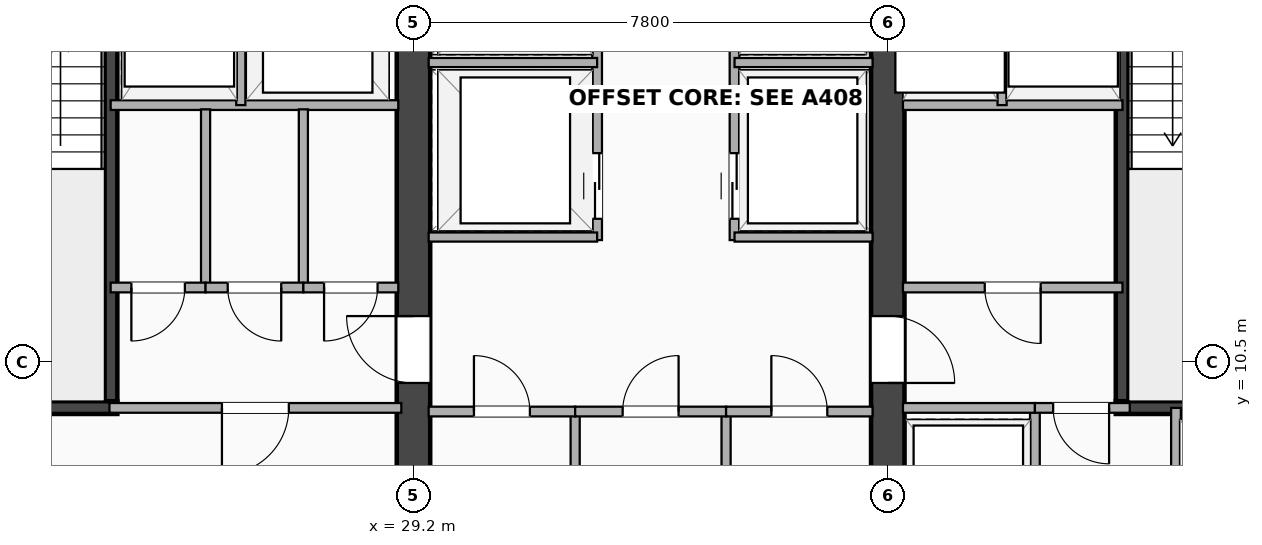
"""IFC4 building model, lengths in metres.
Left out: names, types, materials, properties, quantities, classifications, styles, units other than length and angle.
Written with IfcOpenShell. Run it as: python <this file> out.ifc"""

import sys

from ifc_helpers import new_model, si_unit, direction, frame, frame_2d, origin, place, context, subcontext, project, spatial, rectangle, extrude, element, fill, save


model = new_model("IFC4")
c1 = context("Model", 3, precision=1e-05, world=origin(), true_north=direction((0.0, 1.0)))
c2 = subcontext(c1, "Body", "Model", "MODEL_VIEW")
j1 = project(units=[si_unit("LENGTHUNIT", "METRE"), si_unit("PLANEANGLEUNIT", "RADIAN")], contexts=[c1])
p1 = place(None, origin())
s1 = spatial("IfcSite", under=j1, at=p1, CompositionType="ELEMENT")
p2 = place(p1, origin())
s2 = spatial("IfcBuilding", under=s1, at=p2, CompositionType="ELEMENT")
p3 = place(p2, frame((0.0, 0.0, 95.2)))
s3 = spatial("IfcBuildingStorey", under=s2, at=p3, CompositionType="ELEMENT", Elevation=95.2)
p4 = place(p3, frame((29.2, 3.5, 0.0), z_axis=(0.0, 0.0, 1.0), x_axis=(0.0, 1.0, 0.0)))
e1 = element("IfcWall", 1, at=p4, inside=s3, PredefinedType="SHEAR", context=c2, shape_type="SweptSolid", body=[
    extrude(rectangle(XDim=16.9, YDim=0.55, at=frame_2d((8.45, 0.0))), origin(), (0.0, 0.0, 1.0), 3.24),
])
p5 = place(p4, frame((7.75, 0.0, 0.0), z_axis=(0.0, 0.0, 1.0), x_axis=(-1.0, 0.0, 0.0)))
e2 = element("IfcOpeningElement", 2, at=p5, cuts=e1, PredefinedType="OPENING", context=c2, shape_type="SweptSolid", body=[
    extrude(rectangle(XDim=1.1, YDim=2.15, at=frame_2d((0.55, 1.075))), frame((0.0, 0.285, 0.0), z_axis=(0.0, -1.0, 0.0), x_axis=(1.0, 0.0, 0.0)), (0.0, 0.0, 1.0), 0.57),
])
p6 = place(p3, frame((37.0, 3.5, 0.0), z_axis=(0.0, 0.0, 1.0), x_axis=(0.0, 1.0, 0.0)))
e3 = element("IfcWall", 3, at=p6, inside=s3, PredefinedType="SHEAR", context=c2, shape_type="SweptSolid", body=[
    extrude(rectangle(XDim=16.9, YDim=0.55, at=frame_2d((8.45, 0.0))), origin(), (0.0, 0.0, 1.0), 3.24),
])
p7 = place(p6, frame((6.65, 0.0, 0.0)))
e4 = element("IfcOpeningElement", 4, at=p7, cuts=e3, PredefinedType="OPENING", context=c2, shape_type="SweptSolid", body=[
    extrude(rectangle(XDim=1.1, YDim=2.15, at=frame_2d((0.55, 1.075))), frame((0.0, 0.285, 0.0), z_axis=(0.0, -1.0, 0.0), x_axis=(1.0, 0.0, 0.0)), (0.0, 0.0, 1.0), 0.57),
])
p8 = place(p3, frame((24.225, 9.745, 0.0), z_axis=(0.0, 0.0, 1.0), x_axis=(0.0, 1.0, 0.0)))
e5 = element("IfcWall", 5, at=p8, inside=s3, PredefinedType="SHEAR", context=c2, shape_type="SweptSolid", body=[
    extrude(rectangle(XDim=8.01, YDim=0.21, at=frame_2d((4.005, 0.0))), origin(), (0.0, 0.0, 1.0), 3.24),
])
p9 = place(p3, frame((20.67, 9.745, 0.0), z_axis=(0.0, 0.0, 1.0), x_axis=(1.0, 0.0, 0.0)))
e6 = element("IfcWall", 6, at=p9, inside=s3, PredefinedType="SHEAR", context=c2, shape_type="SweptSolid", body=[
    extrude(rectangle(XDim=3.66, YDim=0.21, at=frame_2d((1.83, 0.0))), origin(), (0.0, 0.0, 1.0), 3.24),
])
p10 = place(p3, frame((40.855, 9.745, 0.0), z_axis=(0.0, 0.0, 1.0), x_axis=(0.0, 1.0, 0.0)))
e7 = element("IfcWall", 7, at=p10, inside=s3, PredefinedType="SHEAR", context=c2, shape_type="SweptSolid", body=[
    extrude(rectangle(XDim=8.01, YDim=0.21, at=frame_2d((4.005, 0.0))), origin(), (0.0, 0.0, 1.0), 3.24),
])
p11 = place(p3, frame((40.75, 9.745, 0.0), z_axis=(0.0, 0.0, 1.0), x_axis=(1.0, 0.0, 0.0)))
e8 = element("IfcWall", 8, at=p11, inside=s3, PredefinedType="SHEAR", context=c2, shape_type="SweptSolid", body=[
    extrude(rectangle(XDim=3.66, YDim=0.21, at=frame_2d((1.83, 0.0))), origin(), (0.0, 0.0, 1.0), 3.24),
])
p12 = place(p3, frame((24.22, 14.72, 0.0), z_axis=(0.0, 0.0, 1.0), x_axis=(1.0, 0.0, 0.0)))
e9 = element("IfcWall", 9, at=p12, inside=s3, PredefinedType="PARTITIONING", context=c2, shape_type="SweptSolid", body=[
    extrude(rectangle(XDim=4.73, YDim=0.16, at=frame_2d((2.365, 0.0))), origin(), (0.0, 0.0, 1.0), 3.24),
])
p13 = place(p3, frame((26.36, 14.72, 0.0), z_axis=(0.0, 0.0, 1.0), x_axis=(0.0, 1.0, 0.0)))
e10 = element("IfcWall", 10, at=p13, inside=s3, PredefinedType="PARTITIONING", context=c2, shape_type="SweptSolid", body=[
    extrude(rectangle(XDim=3.04, YDim=0.15, at=frame_2d((1.52, 0.0))), origin(), (0.0, 0.0, 1.0), 3.24),
])
p14 = place(p3, frame((37.25, 14.72, 0.0), z_axis=(0.0, 0.0, 1.0), x_axis=(1.0, 0.0, 0.0)))
e11 = element("IfcWall", 11, at=p14, inside=s3, PredefinedType="PARTITIONING", context=c2, shape_type="SweptSolid", body=[
    extrude(rectangle(XDim=3.61, YDim=0.16, at=frame_2d((1.805, 0.0))), origin(), (0.0, 0.0, 1.0), 3.24),
])
p15 = place(p3, frame((38.88, 14.72, 0.0), z_axis=(0.0, 0.0, 1.0), x_axis=(0.0, 1.0, 0.0)))
e12 = element("IfcWall", 12, at=p15, inside=s3, PredefinedType="PARTITIONING", context=c2, shape_type="SweptSolid", body=[
    extrude(rectangle(XDim=3.04, YDim=0.15, at=frame_2d((1.52, 0.0))), origin(), (0.0, 0.0, 1.0), 3.24),
])
p16 = place(p3, frame((25.781, 11.72, 0.0), z_axis=(0.0, 0.0, 1.0), x_axis=(0.0, 1.0, 0.0)))
e13 = element("IfcWall", 13, at=p16, inside=s3, PredefinedType="PARTITIONING", context=c2, shape_type="SweptSolid", body=[
    extrude(rectangle(XDim=2.93, YDim=0.15, at=frame_2d((1.465, 0.0))), origin(), (0.0, 0.0, 1.0), 3.24),
])
p17 = place(p3, frame((24.22, 11.72, 0.0), z_axis=(0.0, 0.0, 1.0), x_axis=(1.0, 0.0, 0.0)))
e14 = element("IfcWall", 14, at=p17, inside=s3, PredefinedType="PARTITIONING", context=c2, shape_type="SweptSolid", body=[
    extrude(rectangle(XDim=1.561, YDim=0.16, at=frame_2d((0.781, 0.0))), origin(), (0.0, 0.0, 1.0), 3.24),
])
p18 = place(p17, frame((0.341, 0.0, 0.0)))
e15 = element("IfcOpeningElement", 15, at=p18, cuts=e14, PredefinedType="OPENING", context=c2, shape_type="SweptSolid", body=[
    extrude(rectangle(XDim=0.88, YDim=2.08, at=frame_2d((0.44, 1.04))), frame((0.0, 0.09, 0.0), z_axis=(0.0, -1.0, 0.0), x_axis=(1.0, 0.0, 0.0)), (0.0, 0.0, 1.0), 0.18),
])
p19 = place(p3, frame((27.389, 11.72, 0.0), z_axis=(0.0, 0.0, 1.0), x_axis=(0.0, 1.0, 0.0)))
e16 = element("IfcWall", 16, at=p19, inside=s3, PredefinedType="PARTITIONING", context=c2, shape_type="SweptSolid", body=[
    extrude(rectangle(XDim=2.93, YDim=0.15, at=frame_2d((1.465, 0.0))), origin(), (0.0, 0.0, 1.0), 3.24),
])
p20 = place(p3, frame((25.781, 11.72, 0.0), z_axis=(0.0, 0.0, 1.0), x_axis=(1.0, 0.0, 0.0)))
e17 = element("IfcWall", 17, at=p20, inside=s3, PredefinedType="PARTITIONING", context=c2, shape_type="SweptSolid", body=[
    extrude(rectangle(XDim=1.608, YDim=0.16, at=frame_2d((0.804, 0.0))), origin(), (0.0, 0.0, 1.0), 3.24),
])
p21 = place(p20, frame((0.364, 0.0, 0.0)))
e18 = element("IfcOpeningElement", 18, at=p21, cuts=e17, PredefinedType="OPENING", context=c2, shape_type="SweptSolid", body=[
    extrude(rectangle(XDim=0.88, YDim=2.08, at=frame_2d((0.44, 1.04))), frame((0.0, 0.09, 0.0), z_axis=(0.0, -1.0, 0.0), x_axis=(1.0, 0.0, 0.0)), (0.0, 0.0, 1.0), 0.18),
])
p22 = place(p3, frame((27.389, 11.72, 0.0), z_axis=(0.0, 0.0, 1.0), x_axis=(1.0, 0.0, 0.0)))
e19 = element("IfcWall", 19, at=p22, inside=s3, PredefinedType="PARTITIONING", context=c2, shape_type="SweptSolid", body=[
    extrude(rectangle(XDim=1.561, YDim=0.16, at=frame_2d((0.78, 0.0))), origin(), (0.0, 0.0, 1.0), 3.24),
])
p23 = place(p22, frame((0.341, 0.0, 0.0)))
e20 = element("IfcOpeningElement", 20, at=p23, cuts=e19, PredefinedType="OPENING", context=c2, shape_type="SweptSolid", body=[
    extrude(rectangle(XDim=0.88, YDim=2.08, at=frame_2d((0.44, 1.04))), frame((0.0, 0.09, 0.0), z_axis=(0.0, -1.0, 0.0), x_axis=(1.0, 0.0, 0.0)), (0.0, 0.0, 1.0), 0.18),
])
p24 = place(p3, frame((37.25, 11.72, 0.0), z_axis=(0.0, 0.0, 1.0), x_axis=(1.0, 0.0, 0.0)))
e21 = element("IfcWall", 21, at=p24, inside=s3, PredefinedType="PARTITIONING", context=c2, shape_type="SweptSolid", body=[
    extrude(rectangle(XDim=3.61, YDim=0.16, at=frame_2d((1.805, 0.0))), origin(), (0.0, 0.0, 1.0), 3.24),
])
p25 = place(p24, frame((1.345, 0.0, 0.0)))
e22 = element("IfcOpeningElement", 22, at=p25, cuts=e21, PredefinedType="OPENING", context=c2, shape_type="SweptSolid", body=[
    extrude(rectangle(XDim=0.92, YDim=2.08, at=frame_2d((0.46, 1.04))), frame((0.0, 0.09, 0.0), z_axis=(0.0, -1.0, 0.0), x_axis=(1.0, 0.0, 0.0)), (0.0, 0.0, 1.0), 0.18),
])
p26 = place(p3, frame((24.2, 9.74, 0.0), z_axis=(0.0, 0.0, 1.0), x_axis=(1.0, 0.0, 0.0)))
e23 = element("IfcWall", 23, at=p26, inside=s3, PredefinedType="PARTITIONING", context=c2, shape_type="SweptSolid", body=[
    extrude(rectangle(XDim=4.8, YDim=0.16, at=frame_2d((2.4, 0.0))), origin(), (0.0, 0.0, 1.0), 3.24),
])
p27 = place(p26, frame((1.85, 0.0, 0.0)))
e24 = element("IfcOpeningElement", 24, at=p27, cuts=e23, PredefinedType="OPENING", context=c2, shape_type="SweptSolid", body=[
    extrude(rectangle(XDim=1.1, YDim=2.15, at=frame_2d((0.55, 1.075))), frame((0.0, 0.09, 0.0), z_axis=(0.0, -1.0, 0.0), x_axis=(1.0, 0.0, 0.0)), (0.0, 0.0, 1.0), 0.18),
])
for number, where, z_axis, x_axis in (
    (25, (39.42, 3.9, 0.0), (0.0, 0.0, 1.0), (0.0, 1.0, 0.0)),
    (26, (41.74, 3.9, 0.0), (0.0, 0.0, 1.0), (0.0, 1.0, 0.0)),
):
    element("IfcWall", number, at=place(p3, frame(where, z_axis=z_axis, x_axis=x_axis)), inside=s3, PredefinedType="PARTITIONING", context=c2, shape_type="SweptSolid", body=[
        extrude(rectangle(XDim=5.84, YDim=0.16, at=frame_2d((2.92, 0.0))), origin(), (0.0, 0.0, 1.0), 3.24),
    ])
p28 = place(p3, frame((37.25, 9.74, 0.0), z_axis=(0.0, 0.0, 1.0), x_axis=(1.0, 0.0, 0.0)))
e27 = element("IfcWall", 27, at=p28, inside=s3, PredefinedType="PARTITIONING", context=c2, shape_type="SweptSolid", body=[
    extrude(rectangle(XDim=2.17, YDim=0.16, at=frame_2d((1.085, 0.0))), origin(), (0.0, 0.0, 1.0), 3.24),
])
p29 = place(p3, frame((39.42, 9.74, 0.0), z_axis=(0.0, 0.0, 1.0), x_axis=(1.0, 0.0, 0.0)))
e28 = element("IfcWall", 28, at=p29, inside=s3, PredefinedType="PARTITIONING", context=c2, shape_type="SweptSolid", body=[
    extrude(rectangle(XDim=1.56, YDim=0.16, at=frame_2d((0.78, 0.0))), origin(), (0.0, 0.0, 1.0), 3.24),
])
p30 = place(p29, frame((0.3, 0.0, 0.0)))
e29 = element("IfcOpeningElement", 29, at=p30, cuts=e28, PredefinedType="OPENING", context=c2, shape_type="SweptSolid", body=[
    extrude(rectangle(XDim=0.92, YDim=2.08, at=frame_2d((0.46, 1.04))), frame((0.0, 0.09, 0.0), z_axis=(0.0, -1.0, 0.0), x_axis=(1.0, 0.0, 0.0)), (0.0, 0.0, 1.0), 0.18),
])
p31 = place(p3, frame((31.859, 3.95, 0.0), z_axis=(0.0, 0.0, 1.0), x_axis=(0.0, 1.0, 0.0)))
e30 = element("IfcWall", 30, at=p31, inside=s3, PredefinedType="PARTITIONING", context=c2, shape_type="SweptSolid", body=[
    extrude(rectangle(XDim=5.73, YDim=0.15, at=frame_2d((2.865, 0.0))), origin(), (0.0, 0.0, 1.0), 3.24),
])
p32 = place(p3, frame((29.45, 9.68, 0.0), z_axis=(0.0, 0.0, 1.0), x_axis=(1.0, 0.0, 0.0)))
e31 = element("IfcWall", 31, at=p32, inside=s3, PredefinedType="PARTITIONING", context=c2, shape_type="SweptSolid", body=[
    extrude(rectangle(XDim=2.409, YDim=0.16, at=frame_2d((1.205, 0.0))), origin(), (0.0, 0.0, 1.0), 3.24),
])
p33 = place(p32, frame((1.664, 0.0, 0.0), z_axis=(0.0, 0.0, 1.0), x_axis=(-1.0, 0.0, 0.0)))
e32 = element("IfcOpeningElement", 32, at=p33, cuts=e31, PredefinedType="OPENING", context=c2, shape_type="SweptSolid", body=[
    extrude(rectangle(XDim=0.92, YDim=2.08, at=frame_2d((0.46, 1.04))), frame((0.0, 0.09, 0.0), z_axis=(0.0, -1.0, 0.0), x_axis=(1.0, 0.0, 0.0)), (0.0, 0.0, 1.0), 0.18),
])
p34 = place(p3, frame((34.341, 3.95, 0.0), z_axis=(0.0, 0.0, 1.0), x_axis=(0.0, 1.0, 0.0)))
e33 = element("IfcWall", 33, at=p34, inside=s3, PredefinedType="PARTITIONING", context=c2, shape_type="SweptSolid", body=[
    extrude(rectangle(XDim=5.73, YDim=0.15, at=frame_2d((2.865, 0.0))), origin(), (0.0, 0.0, 1.0), 3.24),
])
p35 = place(p3, frame((31.859, 9.68, 0.0), z_axis=(0.0, 0.0, 1.0), x_axis=(1.0, 0.0, 0.0)))
e34 = element("IfcWall", 34, at=p35, inside=s3, PredefinedType="PARTITIONING", context=c2, shape_type="SweptSolid", body=[
    extrude(rectangle(XDim=2.482, YDim=0.16, at=frame_2d((1.241, 0.0))), origin(), (0.0, 0.0, 1.0), 3.24),
])
p36 = place(p35, frame((1.701, 0.0, 0.0), z_axis=(0.0, 0.0, 1.0), x_axis=(-1.0, 0.0, 0.0)))
e35 = element("IfcOpeningElement", 35, at=p36, cuts=e34, PredefinedType="OPENING", context=c2, shape_type="SweptSolid", body=[
    extrude(rectangle(XDim=0.92, YDim=2.08, at=frame_2d((0.46, 1.04))), frame((0.0, 0.09, 0.0), z_axis=(0.0, -1.0, 0.0), x_axis=(1.0, 0.0, 0.0)), (0.0, 0.0, 1.0), 0.18),
])
p37 = place(p3, frame((34.341, 9.68, 0.0), z_axis=(0.0, 0.0, 1.0), x_axis=(1.0, 0.0, 0.0)))
e36 = element("IfcWall", 36, at=p37, inside=s3, PredefinedType="PARTITIONING", context=c2, shape_type="SweptSolid", body=[
    extrude(rectangle(XDim=2.409, YDim=0.16, at=frame_2d((1.205, 0.0))), origin(), (0.0, 0.0, 1.0), 3.24),
])
p38 = place(p37, frame((1.664, 0.0, 0.0), z_axis=(0.0, 0.0, 1.0), x_axis=(-1.0, 0.0, 0.0)))
e37 = element("IfcOpeningElement", 37, at=p38, cuts=e36, PredefinedType="OPENING", context=c2, shape_type="SweptSolid", body=[
    extrude(rectangle(XDim=0.92, YDim=2.08, at=frame_2d((0.46, 1.04))), frame((0.0, 0.09, 0.0), z_axis=(0.0, -1.0, 0.0), x_axis=(1.0, 0.0, 0.0)), (0.0, 0.0, 1.0), 0.18),
])
p39 = place(p3, frame((32.22, 12.5, 0.0), z_axis=(0.0, 0.0, 1.0), x_axis=(0.0, 1.0, 0.0)))
e38 = element("IfcWall", 38, at=p39, inside=s3, PredefinedType="PARTITIONING", context=c2, shape_type="SweptSolid", body=[
    extrude(rectangle(XDim=7.92, YDim=0.16, at=frame_2d((3.96, 0.0))), origin(), (0.0, 0.0, 1.0), 2.614),
])
p40 = place(p39, frame((1.43, 0.0, 0.0), z_axis=(0.0, 0.0, 1.0), x_axis=(-1.0, 0.0, 0.0)))
e39 = element("IfcOpeningElement", 39, at=p40, cuts=e38, PredefinedType="OPENING", context=c2, shape_type="SweptSolid", body=[
    extrude(rectangle(XDim=1.08, YDim=2.16, at=frame_2d((0.54, 1.08))), frame((0.0, 0.09, 0.0), z_axis=(0.0, -1.0, 0.0), x_axis=(1.0, 0.0, 0.0)), (0.0, 0.0, 1.0), 0.18),
])
p41 = place(p39, frame((4.33, 0.0, 0.0), z_axis=(0.0, 0.0, 1.0), x_axis=(-1.0, 0.0, 0.0)))
e40 = element("IfcOpeningElement", 40, at=p41, cuts=e38, PredefinedType="OPENING", context=c2, shape_type="SweptSolid", body=[
    extrude(rectangle(XDim=1.08, YDim=2.16, at=frame_2d((0.54, 1.08))), frame((0.0, 0.09, 0.0), z_axis=(0.0, -1.0, 0.0), x_axis=(1.0, 0.0, 0.0)), (0.0, 0.0, 1.0), 0.18),
])
p42 = place(p39, frame((6.1, 0.0, 0.0)))
e41 = element("IfcOpeningElement", 41, at=p42, cuts=e38, PredefinedType="OPENING", context=c2, shape_type="SweptSolid", body=[
    extrude(rectangle(XDim=0.88, YDim=2.08, at=frame_2d((0.44, 1.04))), frame((0.0, 0.09, 0.0), z_axis=(0.0, -1.0, 0.0), x_axis=(1.0, 0.0, 0.0)), (0.0, 0.0, 1.0), 0.18),
])
p43 = place(p3, frame((34.48, 12.5, 0.0), z_axis=(0.0, 0.0, 1.0), x_axis=(0.0, 1.0, 0.0)))
e42 = element("IfcWall", 42, at=p43, inside=s3, PredefinedType="PARTITIONING", context=c2, shape_type="SweptSolid", body=[
    extrude(rectangle(XDim=7.92, YDim=0.16, at=frame_2d((3.96, 0.0))), origin(), (0.0, 0.0, 1.0), 2.614),
])
p44 = place(p43, frame((0.35, 0.0, 0.0)))
e43 = element("IfcOpeningElement", 43, at=p44, cuts=e42, PredefinedType="OPENING", context=c2, shape_type="SweptSolid", body=[
    extrude(rectangle(XDim=1.08, YDim=2.16, at=frame_2d((0.54, 1.08))), frame((0.0, 0.09, 0.0), z_axis=(0.0, -1.0, 0.0), x_axis=(1.0, 0.0, 0.0)), (0.0, 0.0, 1.0), 0.18),
])
p45 = place(p43, frame((3.25, 0.0, 0.0)))
e44 = element("IfcOpeningElement", 44, at=p45, cuts=e42, PredefinedType="OPENING", context=c2, shape_type="SweptSolid", body=[
    extrude(rectangle(XDim=1.08, YDim=2.16, at=frame_2d((0.54, 1.08))), frame((0.0, 0.09, 0.0), z_axis=(0.0, -1.0, 0.0), x_axis=(1.0, 0.0, 0.0)), (0.0, 0.0, 1.0), 0.18),
])
p46 = place(p43, frame((6.98, 0.0, 0.0), z_axis=(0.0, 0.0, 1.0), x_axis=(-1.0, 0.0, 0.0)))
e45 = element("IfcOpeningElement", 45, at=p46, cuts=e42, PredefinedType="OPENING", context=c2, shape_type="SweptSolid", body=[
    extrude(rectangle(XDim=0.88, YDim=2.08, at=frame_2d((0.44, 1.04))), frame((0.0, 0.09, 0.0), z_axis=(0.0, -1.0, 0.0), x_axis=(1.0, 0.0, 0.0)), (0.0, 0.0, 1.0), 0.18),
])
p47 = place(p3, frame((29.45, 12.55, 0.0), z_axis=(0.0, 0.0, 1.0), x_axis=(1.0, 0.0, 0.0)))
e46 = element("IfcWall", 46, at=p47, inside=s3, PredefinedType="PARTITIONING", context=c2, shape_type="SweptSolid", body=[
    extrude(rectangle(XDim=2.77, YDim=0.15, at=frame_2d((1.385, 0.0))), origin(), (0.0, 0.0, 1.0), 3.24),
])
p48 = place(p3, frame((34.48, 12.55, 0.0), z_axis=(0.0, 0.0, 1.0), x_axis=(1.0, 0.0, 0.0)))
e47 = element("IfcWall", 47, at=p48, inside=s3, PredefinedType="PARTITIONING", context=c2, shape_type="SweptSolid", body=[
    extrude(rectangle(XDim=2.27, YDim=0.15, at=frame_2d((1.135, 0.0))), origin(), (0.0, 0.0, 1.0), 3.24),
])
p49 = place(p3, frame((29.45, 15.42, 0.0), z_axis=(0.0, 0.0, 1.0), x_axis=(1.0, 0.0, 0.0)))
e48 = element("IfcWall", 48, at=p49, inside=s3, PredefinedType="PARTITIONING", context=c2, shape_type="SweptSolid", body=[
    extrude(rectangle(XDim=2.77, YDim=0.15, at=frame_2d((1.385, 0.0))), origin(), (0.0, 0.0, 1.0), 3.24),
])
p50 = place(p3, frame((34.48, 15.42, 0.0), z_axis=(0.0, 0.0, 1.0), x_axis=(1.0, 0.0, 0.0)))
e49 = element("IfcWall", 49, at=p50, inside=s3, PredefinedType="PARTITIONING", context=c2, shape_type="SweptSolid", body=[
    extrude(rectangle(XDim=2.27, YDim=0.15, at=frame_2d((1.135, 0.0))), origin(), (0.0, 0.0, 1.0), 3.24),
])
p51 = place(p5, origin())
e50 = element("IfcDoor", 50, at=p51, inside=s3, OperationType="SINGLE_SWING_RIGHT", PredefinedType="DOOR", context=c2, shape_type="SweptSolid", body=[
    extrude(rectangle(XDim=1.1, YDim=2.15, at=frame_2d((0.55, 1.075))), frame((0.0, 0.025, 0.0), z_axis=(0.0, -1.0, 0.0), x_axis=(1.0, 0.0, 0.0)), (0.0, 0.0, 1.0), 0.05),
])
fill(e2, e50)
p52 = place(p7, origin())
e51 = element("IfcDoor", 51, at=p52, inside=s3, OperationType="SINGLE_SWING_LEFT", PredefinedType="DOOR", context=c2, shape_type="SweptSolid", body=[
    extrude(rectangle(XDim=1.1, YDim=2.15, at=frame_2d((0.55, 1.075))), frame((0.0, 0.025, 0.0), z_axis=(0.0, -1.0, 0.0), x_axis=(1.0, 0.0, 0.0)), (0.0, 0.0, 1.0), 0.05),
])
fill(e4, e51)
p53 = place(p18, origin())
e52 = element("IfcDoor", 52, at=p53, inside=s3, OperationType="SINGLE_SWING_LEFT", PredefinedType="DOOR", context=c2, shape_type="SweptSolid", body=[
    extrude(rectangle(XDim=0.88, YDim=2.08, at=frame_2d((0.44, 1.04))), frame((0.0, 0.025, 0.0), z_axis=(0.0, -1.0, 0.0), x_axis=(1.0, 0.0, 0.0)), (0.0, 0.0, 1.0), 0.05),
])
fill(e15, e52)
p54 = place(p21, origin())
e53 = element("IfcDoor", 53, at=p54, inside=s3, OperationType="SINGLE_SWING_RIGHT", PredefinedType="DOOR", context=c2, shape_type="SweptSolid", body=[
    extrude(rectangle(XDim=0.88, YDim=2.08, at=frame_2d((0.44, 1.04))), frame((0.0, 0.025, 0.0), z_axis=(0.0, -1.0, 0.0), x_axis=(1.0, 0.0, 0.0)), (0.0, 0.0, 1.0), 0.05),
])
fill(e18, e53)
p55 = place(p23, origin())
e54 = element("IfcDoor", 54, at=p55, inside=s3, OperationType="SINGLE_SWING_LEFT", PredefinedType="DOOR", context=c2, shape_type="SweptSolid", body=[
    extrude(rectangle(XDim=0.88, YDim=2.08, at=frame_2d((0.44, 1.04))), frame((0.0, 0.025, 0.0), z_axis=(0.0, -1.0, 0.0), x_axis=(1.0, 0.0, 0.0)), (0.0, 0.0, 1.0), 0.05),
])
fill(e20, e54)
p56 = place(p25, origin())
e55 = element("IfcDoor", 55, at=p56, inside=s3, OperationType="SINGLE_SWING_RIGHT", PredefinedType="DOOR", context=c2, shape_type="SweptSolid", body=[
    extrude(rectangle(XDim=0.92, YDim=2.08, at=frame_2d((0.46, 1.04))), frame((0.0, 0.025, 0.0), z_axis=(0.0, -1.0, 0.0), x_axis=(1.0, 0.0, 0.0)), (0.0, 0.0, 1.0), 0.05),
])
fill(e22, e55)
p57 = place(p27, origin())
e56 = element("IfcDoor", 56, at=p57, inside=s3, OperationType="SINGLE_SWING_LEFT", PredefinedType="DOOR", context=c2, shape_type="SweptSolid", body=[
    extrude(rectangle(XDim=1.1, YDim=2.15, at=frame_2d((0.55, 1.075))), frame((0.0, 0.025, 0.0), z_axis=(0.0, -1.0, 0.0), x_axis=(1.0, 0.0, 0.0)), (0.0, 0.0, 1.0), 0.05),
])
fill(e24, e56)
p58 = place(p30, origin())
e57 = element("IfcDoor", 57, at=p58, inside=s3, OperationType="SINGLE_SWING_RIGHT", PredefinedType="DOOR", context=c2, shape_type="SweptSolid", body=[
    extrude(rectangle(XDim=0.92, YDim=2.08, at=frame_2d((0.46, 1.04))), frame((0.0, 0.025, 0.0), z_axis=(0.0, -1.0, 0.0), x_axis=(1.0, 0.0, 0.0)), (0.0, 0.0, 1.0), 0.05),
])
fill(e29, e57)
p59 = place(p33, origin())
e58 = element("IfcDoor", 58, at=p59, inside=s3, OperationType="SINGLE_SWING_LEFT", PredefinedType="DOOR", context=c2, shape_type="SweptSolid", body=[
    extrude(rectangle(XDim=0.92, YDim=2.08, at=frame_2d((0.46, 1.04))), frame((0.0, 0.025, 0.0), z_axis=(0.0, -1.0, 0.0), x_axis=(1.0, 0.0, 0.0)), (0.0, 0.0, 1.0), 0.05),
])
fill(e32, e58)
p60 = place(p36, origin())
e59 = element("IfcDoor", 59, at=p60, inside=s3, OperationType="SINGLE_SWING_RIGHT", PredefinedType="DOOR", context=c2, shape_type="SweptSolid", body=[
    extrude(rectangle(XDim=0.92, YDim=2.08, at=frame_2d((0.46, 1.04))), frame((0.0, 0.025, 0.0), z_axis=(0.0, -1.0, 0.0), x_axis=(1.0, 0.0, 0.0)), (0.0, 0.0, 1.0), 0.05),
])
fill(e35, e59)
p61 = place(p38, origin())
e60 = element("IfcDoor", 60, at=p61, inside=s3, OperationType="SINGLE_SWING_LEFT", PredefinedType="DOOR", context=c2, shape_type="SweptSolid", body=[
    extrude(rectangle(XDim=0.92, YDim=2.08, at=frame_2d((0.46, 1.04))), frame((0.0, 0.025, 0.0), z_axis=(0.0, -1.0, 0.0), x_axis=(1.0, 0.0, 0.0)), (0.0, 0.0, 1.0), 0.05),
])
fill(e37, e60)
p62 = place(p40, origin())
e61 = element("IfcDoor", 61, at=p62, inside=s3, OperationType="DOUBLE_DOOR_SLIDING", PredefinedType="DOOR", context=c2, shape_type="SweptSolid", body=[
    extrude(rectangle(XDim=1.08, YDim=2.16, at=frame_2d((0.54, 1.08))), frame((0.0, 0.025, 0.0), z_axis=(0.0, -1.0, 0.0), x_axis=(1.0, 0.0, 0.0)), (0.0, 0.0, 1.0), 0.05),
])
fill(e39, e61)
p63 = place(p44, origin())
e62 = element("IfcDoor", 62, at=p63, inside=s3, OperationType="DOUBLE_DOOR_SLIDING", PredefinedType="DOOR", context=c2, shape_type="SweptSolid", body=[
    extrude(rectangle(XDim=1.08, YDim=2.16, at=frame_2d((0.54, 1.08))), frame((0.0, 0.025, 0.0), z_axis=(0.0, -1.0, 0.0), x_axis=(1.0, 0.0, 0.0)), (0.0, 0.0, 1.0), 0.05),
])
fill(e43, e62)
save(model, sys.argv[1])
